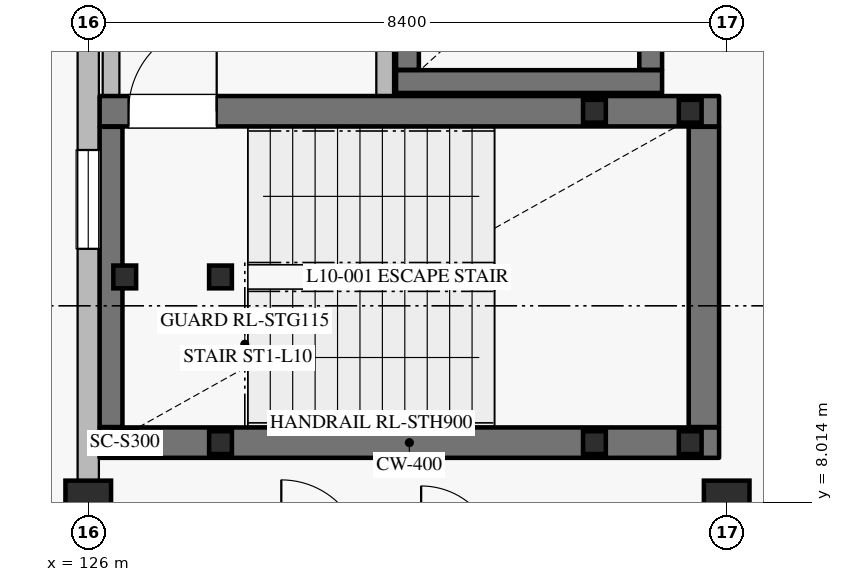
"""IFC4 building model, lengths in metres.
Left out: names, types, materials, properties, quantities, classifications, styles, units other than length and angle.
Written with IfcOpenShell. Run it as: python <this file> out.ifc"""

import sys

from ifc_helpers import new_model, si_unit, direction, frame, frame_2d, origin, origin_2d, place, context, subcontext, project, spatial, rectangle, hollow_rectangle, extrude, element, fill, save


model = new_model("IFC4")
c1 = context("Model", 3, precision=1e-05, world=origin(), true_north=direction((0.0, 1.0)))
c2 = subcontext(c1, "Body", "Model", "MODEL_VIEW")
j1 = project(units=[si_unit("LENGTHUNIT", "METRE"), si_unit("PLANEANGLEUNIT", "RADIAN")], contexts=[c1])
p1 = place(None, origin())
s1 = spatial("IfcSite", under=j1, at=p1, CompositionType="ELEMENT")
p2 = place(p1, origin())
s2 = spatial("IfcBuilding", under=s1, at=p2, CompositionType="ELEMENT")
p3 = place(p2, frame((0.0, 0.0, 43.2)))
s3 = spatial("IfcBuildingStorey", under=s2, at=p3, CompositionType="ELEMENT", Elevation=43.2)
for number, where, z_axis, x_axis in (
    (1, (126.0, 8.0, 0.0), (0.0, 0.0, 1.0), (1.0, 0.0, 0.0)),
    (2, (134.4, 8.0, 0.0), (0.0, 0.0, 1.0), (1.0, 0.0, 0.0)),
):
    element("IfcColumn", number, at=place(p3, frame(where, z_axis=z_axis, x_axis=x_axis)), inside=s3, PredefinedType="COLUMN", context=c2, shape_type="SweptSolid", body=[
        extrude(rectangle(XDim=0.6, YDim=0.6, at=origin_2d()), origin(), (0.0, 0.0, 1.0), 4.2),
    ])
p4 = place(p3, frame((126.0, 8.3, 0.0), z_axis=(0.0, 0.0, 1.0), x_axis=(0.0, 1.0, 0.0)))
e3 = element("IfcWall", 3, at=p4, inside=s3, PredefinedType="SOLIDWALL", context=c2, shape_type="SweptSolid", body=[
    extrude(rectangle(XDim=7.4, YDim=0.28, at=frame_2d((3.7, 0.0))), origin(), (0.0, 0.0, 1.0), 3.3),
])
p5 = place(p4, frame((3.05, 0.0, 0.75)))
e4 = element("IfcOpeningElement", 4, at=p5, cuts=e3, PredefinedType="OPENING", context=c2, shape_type="SweptSolid", body=[
    extrude(rectangle(XDim=1.3, YDim=1.65, at=frame_2d((0.65, 0.825))), frame((0.0, 0.15, 0.0), z_axis=(0.0, -1.0, 0.0), x_axis=(1.0, 0.0, 0.0)), (0.0, 0.0, 1.0), 0.3),
])
p6 = place(p3, frame((130.05, 13.55, 0.0), z_axis=(0.0, 0.0, 1.0), x_axis=(1.0, 0.0, 0.0)))
e5 = element("IfcWall", 5, at=p6, inside=s3, PredefinedType="SHEAR", context=c2, shape_type="SweptSolid", body=[
    extrude(rectangle(XDim=3.5, YDim=0.3, at=frame_2d((1.75, 0.0))), origin(), (0.0, 0.0, 1.0), 3.935),
])
for number, where, z_axis, x_axis in (
    (6, (133.4, 13.705, 0.0), (0.0, 0.0, 1.0), (0.0, 1.0, 0.0)),
    (7, (130.2, 16.295, 0.0), (0.0, 0.0, 1.0), (0.0, -1.0, 0.0)),
):
    element("IfcWall", number, at=place(p3, frame(where, z_axis=z_axis, x_axis=x_axis)), inside=s3, PredefinedType="SHEAR", context=c2, shape_type="SweptSolid", body=[
        extrude(rectangle(XDim=2.59, YDim=0.3, at=frame_2d((1.295, 0.0))), origin(), (0.0, 0.0, 1.0), 3.935),
    ])
p7 = place(p3, frame((126.15, 8.8, 0.0), z_axis=(0.0, 0.0, 1.0), x_axis=(1.0, 0.0, 0.0)))
e8 = element("IfcWall", 8, at=p7, inside=s3, PredefinedType="SHEAR", context=c2, shape_type="SweptSolid", body=[
    extrude(rectangle(XDim=8.15, YDim=0.4, at=frame_2d((4.075, 0.0))), origin(), (0.0, 0.0, 1.0), 3.935),
])
p8 = place(p3, frame((134.1, 9.005, 0.0), z_axis=(0.0, 0.0, 1.0), x_axis=(0.0, 1.0, 0.0)))
e9 = element("IfcWall", 9, at=p8, inside=s3, PredefinedType="SHEAR", context=c2, shape_type="SweptSolid", body=[
    extrude(rectangle(XDim=3.95, YDim=0.4, at=frame_2d((1.975, 0.0))), origin(), (0.0, 0.0, 1.0), 3.935),
])
p9 = place(p3, frame((126.15, 13.16, 0.0), z_axis=(0.0, 0.0, 1.0), x_axis=(1.0, 0.0, 0.0)))
e10 = element("IfcWall", 10, at=p9, inside=s3, PredefinedType="SHEAR", context=c2, shape_type="SweptSolid", body=[
    extrude(rectangle(XDim=8.15, YDim=0.4, at=frame_2d((4.075, 0.0))), origin(), (0.0, 0.0, 1.0), 3.935),
])
p10 = place(p9, frame((0.38, 0.0, 0.0)))
e11 = element("IfcOpeningElement", 11, at=p10, cuts=e10, PredefinedType="OPENING", context=c2, shape_type="SweptSolid", body=[
    extrude(rectangle(XDim=1.16, YDim=2.2, at=frame_2d((0.58, 1.1))), frame((0.0, 0.21, 0.0), z_axis=(0.0, -1.0, 0.0), x_axis=(1.0, 0.0, 0.0)), (0.0, 0.0, 1.0), 0.42),
])
p11 = place(p3, frame((126.3, 9.005, 0.0), z_axis=(0.0, 0.0, 1.0), x_axis=(0.0, 1.0, 0.0)))
e12 = element("IfcWall", 12, at=p11, inside=s3, PredefinedType="SHEAR", context=c2, shape_type="SweptSolid", body=[
    extrude(rectangle(XDim=3.95, YDim=0.3, at=frame_2d((1.975, 0.0))), origin(), (0.0, 0.0, 1.0), 3.935),
])
p12 = place(p3, frame((126.3, 13.365, 0.0), z_axis=(0.0, 0.0, 1.0), x_axis=(0.0, 1.0, 0.0)))
e13 = element("IfcWall", 13, at=p12, inside=s3, PredefinedType="PARTITIONING", context=c2, shape_type="SweptSolid", body=[
    extrude(rectangle(XDim=5.82, YDim=0.22, at=frame_2d((2.91, 0.0))), origin(), (0.0, 0.0, 1.0), 3.935),
])
p13 = place(p3, frame((129.9, 13.365, 0.0), z_axis=(0.0, 0.0, 1.0), x_axis=(0.0, 1.0, 0.0)))
e14 = element("IfcWall", 14, at=p13, inside=s3, PredefinedType="PARTITIONING", context=c2, shape_type="SweptSolid", body=[
    extrude(rectangle(XDim=5.82, YDim=0.22, at=frame_2d((2.91, 0.0))), origin(), (0.0, 0.0, 1.0), 3.935),
])
p14 = place(p13, frame((3.335, 0.0, 0.0)))
e15 = element("IfcOpeningElement", 15, at=p14, cuts=e14, PredefinedType="OPENING", context=c2, shape_type="SweptSolid", body=[
    extrude(rectangle(XDim=1.24, YDim=2.2, at=frame_2d((0.62, 1.1))), frame((0.0, 0.12, 0.0), z_axis=(0.0, -1.0, 0.0), x_axis=(1.0, 0.0, 0.0)), (0.0, 0.0, 1.0), 0.24),
])
for number, where, z_axis, x_axis in (
    (16, (126.48, 8.8, 0.0), (0.0, 0.0, 1.0), (1.0, 0.0, 0.0)),
    (17, (126.48, 10.98, 0.0), (0.0, 0.0, 1.0), (1.0, 0.0, 0.0)),
    (18, (127.74, 8.8, 0.0), (0.0, 0.0, 1.0), (1.0, 0.0, 0.0)),
    (19, (127.74, 10.98, 0.0), (0.0, 0.0, 1.0), (1.0, 0.0, 0.0)),
):
    element("IfcColumn", number, at=place(p3, frame(where, z_axis=z_axis, x_axis=x_axis)), inside=s3, PredefinedType="COLUMN", context=c2, shape_type="SweptSolid", body=[
        extrude(hollow_rectangle(XDim=0.3, YDim=0.3, WallThickness=0.012, at=origin_2d()), origin(), (0.0, 0.0, 1.0), 4.02),
    ])
for number, where, z_axis, x_axis in (
    (20, (132.66, 8.8, -1.8), (0.0, 0.0, 1.0), (1.0, 0.0, 0.0)),
    (21, (132.66, 13.16, -1.8), (0.0, 0.0, 1.0), (1.0, 0.0, 0.0)),
    (22, (133.92, 8.8, -1.8), (0.0, 0.0, 1.0), (1.0, 0.0, 0.0)),
    (23, (133.92, 13.16, -1.8), (0.0, 0.0, 1.0), (1.0, 0.0, 0.0)),
):
    element("IfcColumn", number, at=place(p3, frame(where, z_axis=z_axis, x_axis=x_axis)), inside=s3, PredefinedType="COLUMN", context=c2, shape_type="SweptSolid", body=[
        extrude(hollow_rectangle(XDim=0.3, YDim=0.3, WallThickness=0.012, at=origin_2d()), origin(), (0.0, 0.0, 1.0), 3.72),
    ])
p15 = place(p5, origin())
e24 = element("IfcWindow", 24, at=p15, inside=s3, PartitioningType="SINGLE_PANEL", PredefinedType="WINDOW", context=c2, shape_type="SweptSolid", body=[
    extrude(rectangle(XDim=1.3, YDim=1.65, at=frame_2d((0.65, 0.825))), frame((0.0, 0.03, 0.0), z_axis=(0.0, -1.0, 0.0), x_axis=(1.0, 0.0, 0.0)), (0.0, 0.0, 1.0), 0.06),
])
fill(e4, e24)
p16 = place(p10, origin())
e25 = element("IfcDoor", 25, at=p16, inside=s3, OperationType="SINGLE_SWING_RIGHT", PredefinedType="DOOR", context=c2, shape_type="SweptSolid", body=[
    extrude(rectangle(XDim=1.16, YDim=2.2, at=frame_2d((0.58, 1.1))), frame((0.0, 0.025, 0.0), z_axis=(0.0, -1.0, 0.0), x_axis=(1.0, 0.0, 0.0)), (0.0, 0.0, 1.0), 0.05),
])
fill(e11, e25)
save(model, sys.argv[1])
